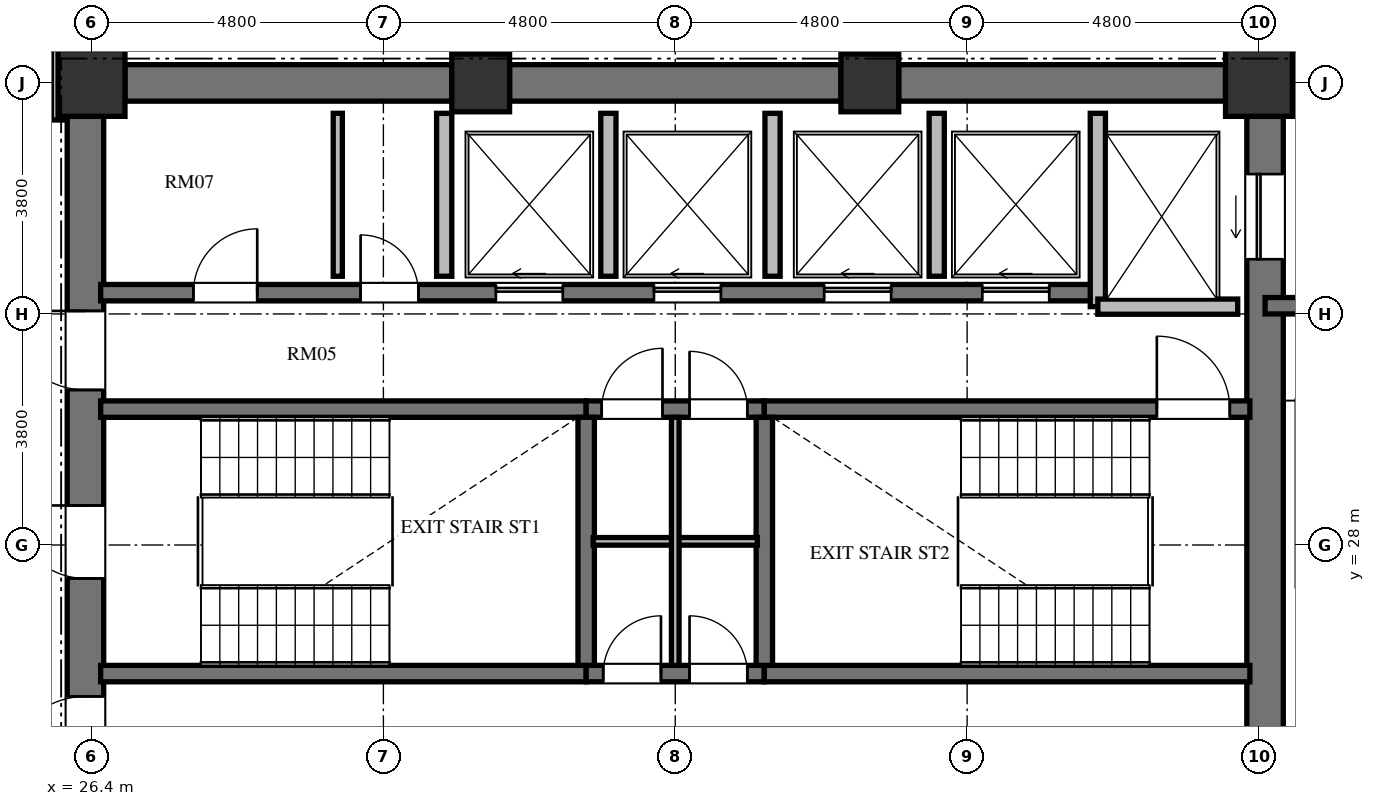
"""IFC4 building model, lengths in metres.
Left out: names, types, materials, properties, quantities, classifications, styles, units other than length and angle.
Written with IfcOpenShell. Run it as: python <this file> out.ifc"""

import sys

from ifc_helpers import new_model, si_unit, direction, frame, frame_2d, origin, origin_2d, place, context, subcontext, project, spatial, rectangle, extrude, element, fill, save


model = new_model("IFC4")
c1 = context("Model", 3, precision=1e-05, world=origin(), true_north=direction((0.0, 1.0)))
c2 = subcontext(c1, "Body", "Model", "MODEL_VIEW")
j1 = project(units=[si_unit("LENGTHUNIT", "METRE"), si_unit("PLANEANGLEUNIT", "RADIAN")], contexts=[c1])
p1 = place(None, origin())
s1 = spatial("IfcSite", under=j1, at=p1, CompositionType="ELEMENT")
p2 = place(p1, origin())
s2 = spatial("IfcBuilding", under=s1, at=p2, CompositionType="ELEMENT")
p3 = place(p2, frame((0.0, 0.0, 163.824)))
s3 = spatial("IfcBuildingStorey", under=s2, at=p3, CompositionType="ELEMENT", Elevation=163.824)
p4 = place(p3, frame((45.6, 35.6, 0.0), z_axis=(0.0, 0.0, 1.0), x_axis=(1.0, 0.0, 0.0)))
e1 = element("IfcColumn", 1, at=p4, inside=s3, PredefinedType="COLUMN", context=c2, shape_type="SweptSolid", body=[
    extrude(rectangle(XDim=1.1, YDim=1.1, at=origin_2d()), origin(), (0.0, 0.0, 1.0), 3.648),
])
for number, where, z_axis, x_axis in (
    (2, (39.2, 35.6, 0.0), (0.0, 0.0, 1.0), (1.0, 0.0, 0.0)),
    (3, (32.8, 35.6, 0.0), (0.0, 0.0, 1.0), (1.0, 0.0, 0.0)),
):
    element("IfcColumn", number, at=place(p3, frame(where, z_axis=z_axis, x_axis=x_axis)), inside=s3, PredefinedType="COLUMN", context=c2, shape_type="SweptSolid", body=[
        extrude(rectangle(XDim=0.95, YDim=0.95, at=origin_2d()), origin(), (0.0, 0.0, 1.0), 3.648),
    ])
p5 = place(p3, frame((26.4, 35.6, 0.0), z_axis=(0.0, 0.0, 1.0), x_axis=(1.0, 0.0, 0.0)))
e4 = element("IfcColumn", 4, at=p5, inside=s3, PredefinedType="COLUMN", context=c2, shape_type="SweptSolid", body=[
    extrude(rectangle(XDim=1.1, YDim=1.1, at=origin_2d()), origin(), (0.0, 0.0, 1.0), 3.648),
])
p6 = place(p3, frame((26.3, 20.95, 0.0), z_axis=(0.0, 0.0, 1.0), x_axis=(0.0, 1.0, 0.0)))
e5 = element("IfcWall", 5, at=p6, inside=s3, PredefinedType="SHEAR", context=c2, shape_type="SweptSolid", body=[
    extrude(rectangle(XDim=14.1, YDim=0.6, at=frame_2d((7.05, 0.0))), origin(), (0.0, 0.0, 1.0), 3.648),
])
p7 = place(p6, frame((6.5, 0.0, 0.0)))
e6 = element("IfcOpeningElement", 6, at=p7, cuts=e5, PredefinedType="OPENING", context=c2, shape_type="SweptSolid", body=[
    extrude(rectangle(XDim=1.2, YDim=2.15, at=frame_2d((0.6, 1.075))), frame((0.0, 0.31, 0.0), z_axis=(0.0, -1.0, 0.0), x_axis=(1.0, 0.0, 0.0)), (0.0, 0.0, 1.0), 0.62),
])
p8 = place(p6, frame((9.6, 0.0, 0.0)))
e7 = element("IfcOpeningElement", 7, at=p8, cuts=e5, PredefinedType="OPENING", context=c2, shape_type="SweptSolid", body=[
    extrude(rectangle(XDim=1.3, YDim=2.2, at=frame_2d((0.65, 1.1))), frame((0.0, 0.31, 0.0), z_axis=(0.0, -1.0, 0.0), x_axis=(1.0, 0.0, 0.0)), (0.0, 0.0, 1.0), 0.62),
])
p9 = place(p6, frame((3.26, 0.0, 0.0)))
e8 = element("IfcOpeningElement", 8, at=p9, cuts=e5, PredefinedType="OPENING", context=c2, shape_type="SweptSolid", body=[
    extrude(rectangle(XDim=1.3, YDim=2.2, at=frame_2d((0.65, 1.1))), frame((0.0, 0.31, 0.0), z_axis=(0.0, -1.0, 0.0), x_axis=(1.0, 0.0, 0.0)), (0.0, 0.0, 1.0), 0.62),
])
p10 = place(p3, frame((45.7, 20.95, 0.0), z_axis=(0.0, 0.0, 1.0), x_axis=(0.0, 1.0, 0.0)))
e9 = element("IfcWall", 9, at=p10, inside=s3, PredefinedType="SHEAR", context=c2, shape_type="SweptSolid", body=[
    extrude(rectangle(XDim=14.1, YDim=0.6, at=frame_2d((7.05, 0.0))), origin(), (0.0, 0.0, 1.0), 3.648),
])
p11 = place(p10, frame((11.75, 0.0, 0.0)))
e10 = element("IfcOpeningElement", 10, at=p11, cuts=e9, PredefinedType="OPENING", context=c2, shape_type="SweptSolid", body=[
    extrude(rectangle(XDim=1.4, YDim=2.3, at=frame_2d((0.7, 1.15))), frame((0.0, 0.31, 0.0), z_axis=(0.0, -1.0, 0.0), x_axis=(1.0, 0.0, 0.0)), (0.0, 0.0, 1.0), 0.62),
])
p12 = place(p10, frame((0.95, 0.0, 0.0)))
e11 = element("IfcOpeningElement", 11, at=p12, cuts=e9, PredefinedType="OPENING", context=c2, shape_type="SweptSolid", body=[
    extrude(rectangle(XDim=1.4, YDim=2.3, at=frame_2d((0.7, 1.15))), frame((0.0, 0.31, 0.0), z_axis=(0.0, -1.0, 0.0), x_axis=(1.0, 0.0, 0.0)), (0.0, 0.0, 1.0), 0.62),
])
p13 = place(p3, frame((26.95, 35.6, 0.0), z_axis=(0.0, 0.0, 1.0), x_axis=(1.0, 0.0, 0.0)))
e12 = element("IfcWall", 12, at=p13, inside=s3, PredefinedType="SHEAR", context=c2, shape_type="SweptSolid", body=[
    extrude(rectangle(XDim=5.375, YDim=0.6, at=frame_2d((2.688, 0.0))), origin(), (0.0, 0.0, 1.0), 3.648),
])
p14 = place(p3, frame((33.275, 35.6, 0.0), z_axis=(0.0, 0.0, 1.0), x_axis=(1.0, 0.0, 0.0)))
e13 = element("IfcWall", 13, at=p14, inside=s3, PredefinedType="SHEAR", context=c2, shape_type="SweptSolid", body=[
    extrude(rectangle(XDim=5.45, YDim=0.6, at=frame_2d((2.725, 0.0))), origin(), (0.0, 0.0, 1.0), 3.648),
])
p15 = place(p3, frame((39.675, 35.6, 0.0), z_axis=(0.0, 0.0, 1.0), x_axis=(1.0, 0.0, 0.0)))
e14 = element("IfcWall", 14, at=p15, inside=s3, PredefinedType="SHEAR", context=c2, shape_type="SweptSolid", body=[
    extrude(rectangle(XDim=5.375, YDim=0.6, at=frame_2d((2.688, 0.0))), origin(), (0.0, 0.0, 1.0), 3.648),
])
p16 = place(p3, frame((26.55, 30.235, 0.0), z_axis=(0.0, 0.0, 1.0), x_axis=(1.0, 0.0, 0.0)))
e15 = element("IfcWall", 15, at=p16, inside=s3, PredefinedType="SHEAR", context=c2, shape_type="SweptSolid", body=[
    extrude(rectangle(XDim=7.985, YDim=0.27, at=frame_2d((3.992, 0.0))), origin(), (0.0, 0.0, 1.0), 3.648),
])
p17 = place(p3, frame((34.535, 30.235, 0.0), z_axis=(0.0, 0.0, 1.0), x_axis=(1.0, 0.0, 0.0)))
e16 = element("IfcWall", 16, at=p17, inside=s3, PredefinedType="SHEAR", context=c2, shape_type="SweptSolid", body=[
    extrude(rectangle(XDim=2.93, YDim=0.27, at=frame_2d((1.465, 0.0))), origin(), (0.0, 0.0, 1.0), 3.648),
])
p18 = place(p17, frame((0.255, 0.0, 0.0)))
e17 = element("IfcOpeningElement", 17, at=p18, cuts=e16, PredefinedType="OPENING", context=c2, shape_type="SweptSolid", body=[
    extrude(rectangle(XDim=1.0, YDim=2.1, at=frame_2d((0.5, 1.05))), frame((0.0, 0.145, 0.0), z_axis=(0.0, -1.0, 0.0), x_axis=(1.0, 0.0, 0.0)), (0.0, 0.0, 1.0), 0.29),
])
p19 = place(p17, frame((1.7, 0.0, 0.0)))
e18 = element("IfcOpeningElement", 18, at=p19, cuts=e16, PredefinedType="OPENING", context=c2, shape_type="SweptSolid", body=[
    extrude(rectangle(XDim=0.95, YDim=2.1, at=frame_2d((0.475, 1.05))), frame((0.0, 0.145, 0.0), z_axis=(0.0, -1.0, 0.0), x_axis=(1.0, 0.0, 0.0)), (0.0, 0.0, 1.0), 0.29),
])
p20 = place(p3, frame((37.465, 30.235, 0.0), z_axis=(0.0, 0.0, 1.0), x_axis=(1.0, 0.0, 0.0)))
e19 = element("IfcWall", 19, at=p20, inside=s3, PredefinedType="SHEAR", context=c2, shape_type="SweptSolid", body=[
    extrude(rectangle(XDim=7.985, YDim=0.27, at=frame_2d((3.992, 0.0))), origin(), (0.0, 0.0, 1.0), 3.648),
])
p21 = place(p20, frame((6.455, 0.0, 0.0)))
e20 = element("IfcOpeningElement", 20, at=p21, cuts=e19, PredefinedType="OPENING", context=c2, shape_type="SweptSolid", body=[
    extrude(rectangle(XDim=1.2, YDim=2.15, at=frame_2d((0.6, 1.075))), frame((0.0, 0.145, 0.0), z_axis=(0.0, -1.0, 0.0), x_axis=(1.0, 0.0, 0.0)), (0.0, 0.0, 1.0), 0.29),
])
p22 = place(p3, frame((26.55, 25.885, 0.0), z_axis=(0.0, 0.0, 1.0), x_axis=(1.0, 0.0, 0.0)))
e21 = element("IfcWall", 21, at=p22, inside=s3, PredefinedType="SHEAR", context=c2, shape_type="SweptSolid", body=[
    extrude(rectangle(XDim=7.985, YDim=0.27, at=frame_2d((3.992, 0.0))), origin(), (0.0, 0.0, 1.0), 3.648),
])
p23 = place(p3, frame((34.535, 25.885, 0.0), z_axis=(0.0, 0.0, 1.0), x_axis=(1.0, 0.0, 0.0)))
e22 = element("IfcWall", 22, at=p23, inside=s3, PredefinedType="SHEAR", context=c2, shape_type="SweptSolid", body=[
    extrude(rectangle(XDim=2.93, YDim=0.27, at=frame_2d((1.465, 0.0))), origin(), (0.0, 0.0, 1.0), 3.648),
])
p24 = place(p23, frame((0.28, 0.0, 0.0)))
e23 = element("IfcOpeningElement", 23, at=p24, cuts=e22, PredefinedType="OPENING", context=c2, shape_type="SweptSolid", body=[
    extrude(rectangle(XDim=0.95, YDim=2.1, at=frame_2d((0.475, 1.05))), frame((0.0, 0.145, 0.0), z_axis=(0.0, -1.0, 0.0), x_axis=(1.0, 0.0, 0.0)), (0.0, 0.0, 1.0), 0.29),
])
p25 = place(p23, frame((1.7, 0.0, 0.0)))
e24 = element("IfcOpeningElement", 24, at=p25, cuts=e22, PredefinedType="OPENING", context=c2, shape_type="SweptSolid", body=[
    extrude(rectangle(XDim=0.95, YDim=2.1, at=frame_2d((0.475, 1.05))), frame((0.0, 0.145, 0.0), z_axis=(0.0, -1.0, 0.0), x_axis=(1.0, 0.0, 0.0)), (0.0, 0.0, 1.0), 0.29),
])
p26 = place(p3, frame((37.465, 25.885, 0.0), z_axis=(0.0, 0.0, 1.0), x_axis=(1.0, 0.0, 0.0)))
e25 = element("IfcWall", 25, at=p26, inside=s3, PredefinedType="SHEAR", context=c2, shape_type="SweptSolid", body=[
    extrude(rectangle(XDim=7.985, YDim=0.27, at=frame_2d((3.992, 0.0))), origin(), (0.0, 0.0, 1.0), 3.648),
])
for number, where, z_axis, x_axis in (
    (26, (34.535, 26.02, 0.0), (0.0, 0.0, 1.0), (0.0, 1.0, 0.0)),
    (27, (37.465, 26.02, 0.0), (0.0, 0.0, 1.0), (0.0, 1.0, 0.0)),
):
    element("IfcWall", number, at=place(p3, frame(where, z_axis=z_axis, x_axis=x_axis)), inside=s3, PredefinedType="SHEAR", context=c2, shape_type="SweptSolid", body=[
        extrude(rectangle(XDim=4.08, YDim=0.27, at=frame_2d((2.04, 0.0))), origin(), (0.0, 0.0, 1.0), 3.648),
    ])
p27 = place(p3, frame((34.65, 28.06, 0.0), z_axis=(0.0, 0.0, 1.0), x_axis=(1.0, 0.0, 0.0)))
e28 = element("IfcWall", 28, at=p27, inside=s3, PredefinedType="PARTITIONING", context=c2, shape_type="SweptSolid", body=[
    extrude(rectangle(XDim=2.7, YDim=0.125, at=frame_2d((1.35, 0.0))), origin(), (0.0, 0.0, 1.0), 3.428),
])
p28 = place(p3, frame((36.0, 26.02, 0.0), z_axis=(0.0, 0.0, 1.0), x_axis=(0.0, 1.0, 0.0)))
e29 = element("IfcWall", 29, at=p28, inside=s3, PredefinedType="PARTITIONING", context=c2, shape_type="SweptSolid", body=[
    extrude(rectangle(XDim=4.08, YDim=0.125, at=frame_2d((2.04, 0.0))), origin(), (0.0, 0.0, 1.0), 3.428),
])
p29 = place(p3, frame((26.55, 32.15, 0.0), z_axis=(0.0, 0.0, 1.0), x_axis=(1.0, 0.0, 0.0)))
e30 = element("IfcWall", 30, at=p29, inside=s3, PredefinedType="SHEAR", context=c2, shape_type="SweptSolid", body=[
    extrude(rectangle(XDim=16.4, YDim=0.27, at=frame_2d((8.2, 0.0))), origin(), (0.0, 0.0, 1.0), 3.648),
])
p30 = place(p29, frame((1.525, 0.0, 0.0)))
e31 = element("IfcOpeningElement", 31, at=p30, cuts=e30, PredefinedType="OPENING", context=c2, shape_type="SweptSolid", body=[
    extrude(rectangle(XDim=1.05, YDim=2.15, at=frame_2d((0.525, 1.075))), frame((0.0, 0.145, 0.0), z_axis=(0.0, -1.0, 0.0), x_axis=(1.0, 0.0, 0.0)), (0.0, 0.0, 1.0), 0.29),
])
p31 = place(p29, frame((4.275, 0.0, 0.0)))
e32 = element("IfcOpeningElement", 32, at=p31, cuts=e30, PredefinedType="OPENING", context=c2, shape_type="SweptSolid", body=[
    extrude(rectangle(XDim=0.95, YDim=2.1, at=frame_2d((0.475, 1.05))), frame((0.0, 0.145, 0.0), z_axis=(0.0, -1.0, 0.0), x_axis=(1.0, 0.0, 0.0)), (0.0, 0.0, 1.0), 0.29),
])
p32 = place(p29, frame((6.5, 0.0, 0.0)))
e33 = element("IfcOpeningElement", 33, at=p32, cuts=e30, PredefinedType="OPENING", context=c2, shape_type="SweptSolid", body=[
    extrude(rectangle(XDim=1.1, YDim=2.2, at=frame_2d((0.55, 1.1))), frame((0.0, 0.145, 0.0), z_axis=(0.0, -1.0, 0.0), x_axis=(1.0, 0.0, 0.0)), (0.0, 0.0, 1.0), 0.29),
])
p33 = place(p29, frame((9.1, 0.0, 0.0)))
e34 = element("IfcOpeningElement", 34, at=p33, cuts=e30, PredefinedType="OPENING", context=c2, shape_type="SweptSolid", body=[
    extrude(rectangle(XDim=1.1, YDim=2.2, at=frame_2d((0.55, 1.1))), frame((0.0, 0.145, 0.0), z_axis=(0.0, -1.0, 0.0), x_axis=(1.0, 0.0, 0.0)), (0.0, 0.0, 1.0), 0.29),
])
p34 = place(p29, frame((11.9, 0.0, 0.0)))
e35 = element("IfcOpeningElement", 35, at=p34, cuts=e30, PredefinedType="OPENING", context=c2, shape_type="SweptSolid", body=[
    extrude(rectangle(XDim=1.1, YDim=2.2, at=frame_2d((0.55, 1.1))), frame((0.0, 0.145, 0.0), z_axis=(0.0, -1.0, 0.0), x_axis=(1.0, 0.0, 0.0)), (0.0, 0.0, 1.0), 0.29),
])
p35 = place(p29, frame((14.5, 0.0, 0.0)))
e36 = element("IfcOpeningElement", 36, at=p35, cuts=e30, PredefinedType="OPENING", context=c2, shape_type="SweptSolid", body=[
    extrude(rectangle(XDim=1.1, YDim=2.2, at=frame_2d((0.55, 1.1))), frame((0.0, 0.145, 0.0), z_axis=(0.0, -1.0, 0.0), x_axis=(1.0, 0.0, 0.0)), (0.0, 0.0, 1.0), 0.29),
])
p36 = place(p3, frame((42.95, 31.92, 0.0), z_axis=(0.0, 0.0, 1.0), x_axis=(0.0, 1.0, 0.0)))
e37 = element("IfcWall", 37, at=p36, inside=s3, PredefinedType="SOLIDWALL", context=c2, shape_type="SweptSolid", body=[
    extrude(rectangle(XDim=3.18, YDim=0.25, at=frame_2d((1.59, 0.0))), origin(), (0.0, 0.0, 1.0), 3.428),
])
p37 = place(p3, frame((42.95, 31.92, 0.0), z_axis=(0.0, 0.0, 1.0), x_axis=(1.0, 0.0, 0.0)))
e38 = element("IfcWall", 38, at=p37, inside=s3, PredefinedType="SOLIDWALL", context=c2, shape_type="SweptSolid", body=[
    extrude(rectangle(XDim=2.3, YDim=0.25, at=frame_2d((1.15, 0.0))), origin(), (0.0, 0.0, 1.0), 3.428),
])
for number, where, z_axis, x_axis in (
    (39, (32.2, 32.42, 0.0), (0.0, 0.0, 1.0), (0.0, 1.0, 0.0)),
    (40, (34.9, 32.42, 0.0), (0.0, 0.0, 1.0), (0.0, 1.0, 0.0)),
    (41, (37.6, 32.42, 0.0), (0.0, 0.0, 1.0), (0.0, 1.0, 0.0)),
    (42, (40.3, 32.42, 0.0), (0.0, 0.0, 1.0), (0.0, 1.0, 0.0)),
):
    element("IfcWall", number, at=place(p3, frame(where, z_axis=z_axis, x_axis=x_axis)), inside=s3, PredefinedType="SOLIDWALL", context=c2, shape_type="SweptSolid", body=[
        extrude(rectangle(XDim=2.68, YDim=0.25, at=frame_2d((1.34, 0.0))), origin(), (0.0, 0.0, 1.0), 3.428),
    ])
p38 = place(p3, frame((30.45, 32.42, 0.0), z_axis=(0.0, 0.0, 1.0), x_axis=(0.0, 1.0, 0.0)))
e43 = element("IfcWall", 43, at=p38, inside=s3, PredefinedType="PARTITIONING", context=c2, shape_type="SweptSolid", body=[
    extrude(rectangle(XDim=2.68, YDim=0.15, at=frame_2d((1.34, 0.0))), origin(), (0.0, 0.0, 1.0), 3.428),
])
p39 = place(p3, frame((46.0, 35.98, 0.0), z_axis=(0.0, 0.0, 1.0), x_axis=(1.0, 0.0, 0.0)))
e44 = element("IfcWall", 44, at=p39, inside=s3, PredefinedType="SHEAR", context=c2, shape_type="SweptSolid", body=[
    extrude(rectangle(XDim=4.55, YDim=0.27, at=frame_2d((2.275, 0.0))), origin(), (0.0, 0.0, 1.0), 3.648),
])
p40 = place(p3, frame((45.7, 31.935, 0.0), z_axis=(0.0, 0.0, 1.0), x_axis=(1.0, 0.0, 0.0)))
e45 = element("IfcWall", 45, at=p40, inside=s3, PredefinedType="SHEAR", context=c2, shape_type="SweptSolid", body=[
    extrude(rectangle(XDim=4.715, YDim=0.27, at=frame_2d((2.357, 0.0))), origin(), (0.0, 0.0, 1.0), 3.648),
])
p41 = place(p3, frame((25.83, 36.21, 0.0), z_axis=(0.0, 0.0, 1.0), x_axis=(0.0, -1.0, 0.0)))
e46 = element("IfcWall", 46, at=p41, inside=s3, PredefinedType="PARTITIONING", context=c2, shape_type="SweptSolid", body=[
    extrude(rectangle(XDim=1.22, YDim=0.18, at=frame_2d((0.61, 0.0))), origin(), (0.0, 0.0, 1.0), 3.428),
])
p42 = place(p7, origin())
e47 = element("IfcDoor", 47, at=p42, inside=s3, OperationType="SINGLE_SWING_RIGHT", PredefinedType="DOOR", context=c2, shape_type="SweptSolid", body=[
    extrude(rectangle(XDim=1.2, YDim=2.15, at=frame_2d((0.6, 1.075))), frame((0.0, 0.025, 0.0), z_axis=(0.0, -1.0, 0.0), x_axis=(1.0, 0.0, 0.0)), (0.0, 0.0, 1.0), 0.05),
])
fill(e6, e47)
p43 = place(p21, origin())
e48 = element("IfcDoor", 48, at=p43, inside=s3, OperationType="SINGLE_SWING_LEFT", PredefinedType="DOOR", context=c2, shape_type="SweptSolid", body=[
    extrude(rectangle(XDim=1.2, YDim=2.15, at=frame_2d((0.6, 1.075))), frame((0.0, 0.025, 0.0), z_axis=(0.0, -1.0, 0.0), x_axis=(1.0, 0.0, 0.0)), (0.0, 0.0, 1.0), 0.05),
])
fill(e20, e48)
p44 = place(p24, origin())
e49 = element("IfcDoor", 49, at=p44, inside=s3, OperationType="SINGLE_SWING_RIGHT", PredefinedType="DOOR", context=c2, shape_type="SweptSolid", body=[
    extrude(rectangle(XDim=0.95, YDim=2.1, at=frame_2d((0.475, 1.05))), frame((0.0, 0.025, 0.0), z_axis=(0.0, -1.0, 0.0), x_axis=(1.0, 0.0, 0.0)), (0.0, 0.0, 1.0), 0.05),
])
fill(e23, e49)
p45 = place(p25, origin())
e50 = element("IfcDoor", 50, at=p45, inside=s3, OperationType="SINGLE_SWING_LEFT", PredefinedType="DOOR", context=c2, shape_type="SweptSolid", body=[
    extrude(rectangle(XDim=0.95, YDim=2.1, at=frame_2d((0.475, 1.05))), frame((0.0, 0.025, 0.0), z_axis=(0.0, -1.0, 0.0), x_axis=(1.0, 0.0, 0.0)), (0.0, 0.0, 1.0), 0.05),
])
fill(e24, e50)
p46 = place(p18, origin())
e51 = element("IfcDoor", 51, at=p46, inside=s3, OperationType="SINGLE_SWING_RIGHT", PredefinedType="DOOR", context=c2, shape_type="SweptSolid", body=[
    extrude(rectangle(XDim=1.0, YDim=2.1, at=frame_2d((0.5, 1.05))), frame((0.0, 0.025, 0.0), z_axis=(0.0, -1.0, 0.0), x_axis=(1.0, 0.0, 0.0)), (0.0, 0.0, 1.0), 0.05),
])
fill(e17, e51)
p47 = place(p19, origin())
e52 = element("IfcDoor", 52, at=p47, inside=s3, OperationType="SINGLE_SWING_LEFT", PredefinedType="DOOR", context=c2, shape_type="SweptSolid", body=[
    extrude(rectangle(XDim=0.95, YDim=2.1, at=frame_2d((0.475, 1.05))), frame((0.0, 0.025, 0.0), z_axis=(0.0, -1.0, 0.0), x_axis=(1.0, 0.0, 0.0)), (0.0, 0.0, 1.0), 0.05),
])
fill(e18, e52)
p48 = place(p8, origin())
e53 = element("IfcDoor", 53, at=p48, inside=s3, OperationType="SINGLE_SWING_RIGHT", PredefinedType="DOOR", context=c2, shape_type="SweptSolid", body=[
    extrude(rectangle(XDim=1.3, YDim=2.2, at=frame_2d((0.65, 1.1))), frame((0.0, 0.025, 0.0), z_axis=(0.0, -1.0, 0.0), x_axis=(1.0, 0.0, 0.0)), (0.0, 0.0, 1.0), 0.05),
])
fill(e7, e53)
p49 = place(p9, origin())
e54 = element("IfcDoor", 54, at=p49, inside=s3, OperationType="SINGLE_SWING_LEFT", PredefinedType="DOOR", context=c2, shape_type="SweptSolid", body=[
    extrude(rectangle(XDim=1.3, YDim=2.2, at=frame_2d((0.65, 1.1))), frame((0.0, 0.025, 0.0), z_axis=(0.0, -1.0, 0.0), x_axis=(1.0, 0.0, 0.0)), (0.0, 0.0, 1.0), 0.05),
])
fill(e8, e54)
p50 = place(p30, origin())
e55 = element("IfcDoor", 55, at=p50, inside=s3, OperationType="SINGLE_SWING_RIGHT", PredefinedType="DOOR", context=c2, shape_type="SweptSolid", body=[
    extrude(rectangle(XDim=1.05, YDim=2.15, at=frame_2d((0.525, 1.075))), frame((0.0, 0.025, 0.0), z_axis=(0.0, -1.0, 0.0), x_axis=(1.0, 0.0, 0.0)), (0.0, 0.0, 1.0), 0.05),
])
fill(e31, e55)
p51 = place(p31, origin())
e56 = element("IfcDoor", 56, at=p51, inside=s3, OperationType="SINGLE_SWING_LEFT", PredefinedType="DOOR", context=c2, shape_type="SweptSolid", body=[
    extrude(rectangle(XDim=0.95, YDim=2.1, at=frame_2d((0.475, 1.05))), frame((0.0, 0.025, 0.0), z_axis=(0.0, -1.0, 0.0), x_axis=(1.0, 0.0, 0.0)), (0.0, 0.0, 1.0), 0.05),
])
fill(e32, e56)
p52 = place(p32, origin())
e57 = element("IfcDoor", 57, at=p52, inside=s3, OperationType="SLIDING_TO_LEFT", PredefinedType="DOOR", context=c2, shape_type="SweptSolid", body=[
    extrude(rectangle(XDim=1.1, YDim=2.2, at=frame_2d((0.55, 1.1))), frame((0.0, 0.025, 0.0), z_axis=(0.0, -1.0, 0.0), x_axis=(1.0, 0.0, 0.0)), (0.0, 0.0, 1.0), 0.05),
])
fill(e33, e57)
p53 = place(p33, origin())
e58 = element("IfcDoor", 58, at=p53, inside=s3, OperationType="SLIDING_TO_LEFT", PredefinedType="DOOR", context=c2, shape_type="SweptSolid", body=[
    extrude(rectangle(XDim=1.1, YDim=2.2, at=frame_2d((0.55, 1.1))), frame((0.0, 0.025, 0.0), z_axis=(0.0, -1.0, 0.0), x_axis=(1.0, 0.0, 0.0)), (0.0, 0.0, 1.0), 0.05),
])
fill(e34, e58)
p54 = place(p34, origin())
e59 = element("IfcDoor", 59, at=p54, inside=s3, OperationType="SLIDING_TO_LEFT", PredefinedType="DOOR", context=c2, shape_type="SweptSolid", body=[
    extrude(rectangle(XDim=1.1, YDim=2.2, at=frame_2d((0.55, 1.1))), frame((0.0, 0.025, 0.0), z_axis=(0.0, -1.0, 0.0), x_axis=(1.0, 0.0, 0.0)), (0.0, 0.0, 1.0), 0.05),
])
fill(e35, e59)
p55 = place(p35, origin())
e60 = element("IfcDoor", 60, at=p55, inside=s3, OperationType="SLIDING_TO_LEFT", PredefinedType="DOOR", context=c2, shape_type="SweptSolid", body=[
    extrude(rectangle(XDim=1.1, YDim=2.2, at=frame_2d((0.55, 1.1))), frame((0.0, 0.025, 0.0), z_axis=(0.0, -1.0, 0.0), x_axis=(1.0, 0.0, 0.0)), (0.0, 0.0, 1.0), 0.05),
])
fill(e36, e60)
p56 = place(p11, origin())
e61 = element("IfcDoor", 61, at=p56, inside=s3, OperationType="SLIDING_TO_LEFT", PredefinedType="DOOR", context=c2, shape_type="SweptSolid", body=[
    extrude(rectangle(XDim=1.4, YDim=2.3, at=frame_2d((0.7, 1.15))), frame((0.0, 0.025, 0.0), z_axis=(0.0, -1.0, 0.0), x_axis=(1.0, 0.0, 0.0)), (0.0, 0.0, 1.0), 0.05),
])
fill(e10, e61)
save(model, sys.argv[1])
